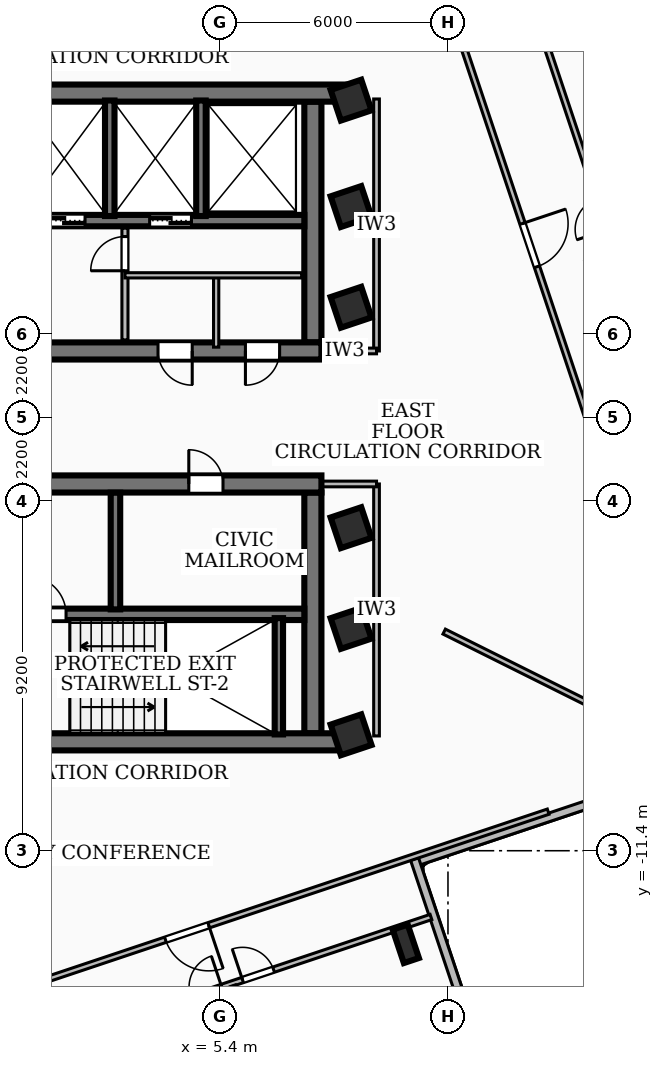
"""IFC4 building model, lengths in metres.
Left out: names, types, materials, properties, quantities, classifications, styles, units other than length and angle.
Written with IfcOpenShell. Run it as: python <this file> out.ifc"""

import sys

from ifc_helpers import new_model, si_unit, direction, frame, frame_2d, origin, origin_2d, place, context, subcontext, project, spatial, rectangle, i_section, extrude, element, fill, save


model = new_model("IFC4")
c1 = context("Model", 3, precision=1e-05, world=origin(), true_north=direction((0.0, 1.0)))
c2 = subcontext(c1, "Body", "Model", "MODEL_VIEW")
j1 = project(units=[si_unit("LENGTHUNIT", "METRE"), si_unit("PLANEANGLEUNIT", "RADIAN")], contexts=[c1])
p1 = place(None, origin())
s1 = spatial("IfcSite", under=j1, at=p1, CompositionType="ELEMENT")
p2 = place(p1, origin())
s2 = spatial("IfcBuilding", under=s1, at=p2, CompositionType="ELEMENT")
p3 = place(p2, frame((0.0, 0.0, 163.08)))
s3 = spatial("IfcBuildingStorey", under=s2, at=p3, CompositionType="ELEMENT", Elevation=163.08)
p4 = place(p3, frame((-8.78, 8.535, 0.0), z_axis=(0.0, 0.0, 1.0), x_axis=(1.0, 0.0, 0.0)))
e1 = element("IfcWall", 1, at=p4, inside=s3, PredefinedType="SHEAR", context=c2, shape_type="SweptSolid", body=[
    extrude(rectangle(XDim=17.56, YDim=0.45, at=frame_2d((8.78, 0.0))), origin(), (0.0, 0.0, 1.0), 3.34),
])
p5 = place(p3, frame((8.07, 1.75, 0.0), z_axis=(0.0, 0.0, 1.0), x_axis=(-1.0, 0.0, 0.0)))
e2 = element("IfcWall", 2, at=p5, inside=s3, PredefinedType="SHEAR", context=c2, shape_type="SweptSolid", body=[
    extrude(rectangle(XDim=16.14, YDim=0.45, at=frame_2d((8.07, 0.0))), origin(), (0.0, 0.0, 1.0), 3.34),
])
p6 = place(p5, frame((7.45, 0.0, 0.0)))
e3 = element("IfcOpeningElement", 3, at=p6, cuts=e2, PredefinedType="OPENING", context=c2, shape_type="SweptSolid", body=[
    extrude(rectangle(XDim=1.0, YDim=2.1, at=frame_2d((0.5, 1.05))), frame((0.0, 0.235, 0.0), z_axis=(0.0, -1.0, 0.0), x_axis=(1.0, 0.0, 0.0)), (0.0, 0.0, 1.0), 0.47),
])
p7 = place(p5, frame((3.4, 0.0, 0.0)))
e4 = element("IfcOpeningElement", 4, at=p7, cuts=e2, PredefinedType="OPENING", context=c2, shape_type="SweptSolid", body=[
    extrude(rectangle(XDim=0.9, YDim=2.06, at=frame_2d((0.45, 1.03))), frame((0.0, 0.235, 0.0), z_axis=(0.0, -1.0, 0.0), x_axis=(1.0, 0.0, 0.0)), (0.0, 0.0, 1.0), 0.47),
])
p8 = place(p5, frame((1.1, 0.0, 0.0)))
e5 = element("IfcOpeningElement", 5, at=p8, cuts=e2, PredefinedType="OPENING", context=c2, shape_type="SweptSolid", body=[
    extrude(rectangle(XDim=0.9, YDim=2.06, at=frame_2d((0.45, 1.03))), frame((0.0, 0.235, 0.0), z_axis=(0.0, -1.0, 0.0), x_axis=(1.0, 0.0, 0.0)), (0.0, 0.0, 1.0), 0.47),
])
p9 = place(p3, frame((7.845, 8.31, 0.0), z_axis=(0.0, 0.0, 1.0), x_axis=(0.0, -1.0, 0.0)))
e6 = element("IfcWall", 6, at=p9, inside=s3, PredefinedType="SHEAR", context=c2, shape_type="SweptSolid", body=[
    extrude(rectangle(XDim=6.335, YDim=0.45, at=frame_2d((3.167, 0.0))), origin(), (0.0, 0.0, 1.0), 3.34),
])
p10 = place(p3, frame((7.62, 5.18, 0.0), z_axis=(0.0, 0.0, 1.0), x_axis=(-1.0, 0.0, 0.0)))
e7 = element("IfcWall", 7, at=p10, inside=s3, PredefinedType="SOLIDWALL", context=c2, shape_type="SweptSolid", body=[
    extrude(rectangle(XDim=15.24, YDim=0.3, at=frame_2d((7.62, 0.0))), origin(), (0.0, 0.0, 1.0), 3.34),
])
p11 = place(p10, frame((5.77, 0.0, 0.0)))
e8 = element("IfcOpeningElement", 8, at=p11, cuts=e7, PredefinedType="OPENING", context=c2, shape_type="SweptSolid", body=[
    extrude(rectangle(XDim=1.1, YDim=2.15, at=frame_2d((0.55, 1.075))), frame((0.0, 0.16, 0.0), z_axis=(0.0, -1.0, 0.0), x_axis=(1.0, 0.0, 0.0)), (0.0, 0.0, 1.0), 0.32),
])
p12 = place(p10, frame((2.97, 0.0, 0.0)))
e9 = element("IfcOpeningElement", 9, at=p12, cuts=e7, PredefinedType="OPENING", context=c2, shape_type="SweptSolid", body=[
    extrude(rectangle(XDim=1.1, YDim=2.15, at=frame_2d((0.55, 1.075))), frame((0.0, 0.16, 0.0), z_axis=(0.0, -1.0, 0.0), x_axis=(1.0, 0.0, 0.0)), (0.0, 0.0, 1.0), 0.32),
])
p13 = place(p10, frame((7.97, 0.0, 0.0)))
e10 = element("IfcOpeningElement", 10, at=p13, cuts=e7, PredefinedType="OPENING", context=c2, shape_type="SweptSolid", body=[
    extrude(rectangle(XDim=1.0, YDim=2.1, at=frame_2d((0.5, 1.05))), frame((0.0, 0.16, 0.0), z_axis=(0.0, -1.0, 0.0), x_axis=(1.0, 0.0, 0.0)), (0.0, 0.0, 1.0), 0.32),
])
p14 = place(p3, frame((8.78, -8.535, 0.0), z_axis=(0.0, 0.0, 1.0), x_axis=(-1.0, 0.0, 0.0)))
e11 = element("IfcWall", 11, at=p14, inside=s3, PredefinedType="SHEAR", context=c2, shape_type="SweptSolid", body=[
    extrude(rectangle(XDim=17.56, YDim=0.45, at=frame_2d((8.78, 0.0))), origin(), (0.0, 0.0, 1.0), 3.34),
])
p15 = place(p3, frame((-8.07, -1.75, 0.0), z_axis=(0.0, 0.0, 1.0), x_axis=(1.0, 0.0, 0.0)))
e12 = element("IfcWall", 12, at=p15, inside=s3, PredefinedType="SHEAR", context=c2, shape_type="SweptSolid", body=[
    extrude(rectangle(XDim=16.14, YDim=0.45, at=frame_2d((8.07, 0.0))), origin(), (0.0, 0.0, 1.0), 3.34),
])
p16 = place(p15, frame((7.45, 0.0, 0.0)))
e13 = element("IfcOpeningElement", 13, at=p16, cuts=e12, PredefinedType="OPENING", context=c2, shape_type="SweptSolid", body=[
    extrude(rectangle(XDim=1.0, YDim=2.1, at=frame_2d((0.5, 1.05))), frame((0.0, 0.235, 0.0), z_axis=(0.0, -1.0, 0.0), x_axis=(1.0, 0.0, 0.0)), (0.0, 0.0, 1.0), 0.47),
])
p17 = place(p15, frame((12.65, 0.0, 0.0)))
e14 = element("IfcOpeningElement", 14, at=p17, cuts=e12, PredefinedType="OPENING", context=c2, shape_type="SweptSolid", body=[
    extrude(rectangle(XDim=0.9, YDim=2.06, at=frame_2d((0.45, 1.03))), frame((0.0, 0.235, 0.0), z_axis=(0.0, -1.0, 0.0), x_axis=(1.0, 0.0, 0.0)), (0.0, 0.0, 1.0), 0.47),
])
p18 = place(p15, frame((0.565, 0.0, 0.0)))
e15 = element("IfcOpeningElement", 15, at=p18, cuts=e12, PredefinedType="OPENING", context=c2, shape_type="SweptSolid", body=[
    extrude(rectangle(XDim=1.05, YDim=2.15, at=frame_2d((0.525, 1.075))), frame((0.0, 0.235, 0.0), z_axis=(0.0, -1.0, 0.0), x_axis=(1.0, 0.0, 0.0)), (0.0, 0.0, 1.0), 0.47),
])
p19 = place(p15, frame((2.125, 0.0, 0.0)))
e16 = element("IfcOpeningElement", 16, at=p19, cuts=e12, PredefinedType="OPENING", context=c2, shape_type="SweptSolid", body=[
    extrude(rectangle(XDim=1.05, YDim=2.15, at=frame_2d((0.525, 1.075))), frame((0.0, 0.235, 0.0), z_axis=(0.0, -1.0, 0.0), x_axis=(1.0, 0.0, 0.0)), (0.0, 0.0, 1.0), 0.47),
])
p20 = place(p15, frame((3.685, 0.0, 0.0)))
e17 = element("IfcOpeningElement", 17, at=p20, cuts=e12, PredefinedType="OPENING", context=c2, shape_type="SweptSolid", body=[
    extrude(rectangle(XDim=1.05, YDim=2.15, at=frame_2d((0.525, 1.075))), frame((0.0, 0.235, 0.0), z_axis=(0.0, -1.0, 0.0), x_axis=(1.0, 0.0, 0.0)), (0.0, 0.0, 1.0), 0.47),
])
p21 = place(p3, frame((7.845, -1.975, 0.0), z_axis=(0.0, 0.0, 1.0), x_axis=(0.0, -1.0, 0.0)))
e18 = element("IfcWall", 18, at=p21, inside=s3, PredefinedType="SHEAR", context=c2, shape_type="SweptSolid", body=[
    extrude(rectangle(XDim=6.335, YDim=0.45, at=frame_2d((3.167, 0.0))), origin(), (0.0, 0.0, 1.0), 3.34),
])
p22 = place(p3, frame((-7.62, -5.18, 0.0), z_axis=(0.0, 0.0, 1.0), x_axis=(1.0, 0.0, 0.0)))
e19 = element("IfcWall", 19, at=p22, inside=s3, PredefinedType="SOLIDWALL", context=c2, shape_type="SweptSolid", body=[
    extrude(rectangle(XDim=15.24, YDim=0.3, at=frame_2d((7.62, 0.0))), origin(), (0.0, 0.0, 1.0), 3.34),
])
p23 = place(p22, frame((5.77, 0.0, 0.0)))
e20 = element("IfcOpeningElement", 20, at=p23, cuts=e19, PredefinedType="OPENING", context=c2, shape_type="SweptSolid", body=[
    extrude(rectangle(XDim=1.1, YDim=2.15, at=frame_2d((0.55, 1.075))), frame((0.0, 0.16, 0.0), z_axis=(0.0, -1.0, 0.0), x_axis=(1.0, 0.0, 0.0)), (0.0, 0.0, 1.0), 0.32),
])
p24 = place(p22, frame((7.97, 0.0, 0.0)))
e21 = element("IfcOpeningElement", 21, at=p24, cuts=e19, PredefinedType="OPENING", context=c2, shape_type="SweptSolid", body=[
    extrude(rectangle(XDim=1.0, YDim=2.1, at=frame_2d((0.5, 1.05))), frame((0.0, 0.16, 0.0), z_axis=(0.0, -1.0, 0.0), x_axis=(1.0, 0.0, 0.0)), (0.0, 0.0, 1.0), 0.32),
])
p25 = place(p3, frame((6.95, -8.34, 0.0), z_axis=(0.0, 0.0, 1.0), x_axis=(0.0, 1.0, 0.0)))
e22 = element("IfcWall", 22, at=p25, inside=s3, PredefinedType="SOLIDWALL", context=c2, shape_type="SweptSolid", body=[
    extrude(rectangle(XDim=3.06, YDim=0.22, at=frame_2d((1.53, 0.0))), origin(), (0.0, 0.0, 1.0), 3.34),
])
for number, where, z_axis, x_axis in (
    (23, (2.5, 5.3, 0.0), (0.0, 0.0, 1.0), (0.0, 1.0, 0.0)),
    (24, (4.9, 5.3, 0.0), (0.0, 0.0, 1.0), (0.0, 1.0, 0.0)),
):
    element("IfcWall", number, at=place(p3, frame(where, z_axis=z_axis, x_axis=x_axis)), inside=s3, PredefinedType="SOLIDWALL", context=c2, shape_type="SweptSolid", body=[
        extrude(rectangle(XDim=3.04, YDim=0.25, at=frame_2d((1.52, 0.0))), origin(), (0.0, 0.0, 1.0), 3.34),
    ])
p26 = place(p3, frame((2.65, -5.05, 0.0), z_axis=(0.0, 0.0, 1.0), x_axis=(0.0, 1.0, 0.0)))
e25 = element("IfcWall", 25, at=p26, inside=s3, PredefinedType="SOLIDWALL", context=c2, shape_type="SweptSolid", body=[
    extrude(rectangle(XDim=3.07, YDim=0.25, at=frame_2d((1.535, 0.0))), origin(), (0.0, 0.0, 1.0), 3.34),
])
for number, where, z_axis, x_axis in (
    (26, (8.85, -5.55, 0.0), (0.0, 0.0, 1.0), (0.948, 0.317, 0.0)),
    (27, (8.85, -2.9, 0.0), (0.0, 0.0, 1.0), (0.948, 0.317, 0.0)),
    (28, (8.85, 2.9, 0.0), (0.0, 0.0, 1.0), (0.948, 0.317, 0.0)),
    (29, (8.85, 5.55, 0.0), (0.0, 0.0, 1.0), (0.948, 0.317, 0.0)),
    (30, (8.85, -8.35, 0.0), (0.0, 0.0, 1.0), (0.948, 0.317, 0.0)),
    (31, (8.85, 8.35, 0.0), (0.0, 0.0, 1.0), (0.948, 0.317, 0.0)),
):
    element("IfcColumn", number, at=place(p3, frame(where, z_axis=z_axis, x_axis=x_axis)), inside=s3, PredefinedType="COLUMN", context=c2, shape_type="SweptSolid", body=[
        extrude(rectangle(XDim=0.85, YDim=0.85, at=origin_2d()), origin(), (0.0, 0.0, 1.0), 3.6),
    ])
p27 = place(p3, frame((10.29, -13.85, 0.0), z_axis=(0.0, 0.0, 1.0), x_axis=(0.948323655206, 0.317304656405, 0.0)))
e32 = element("IfcColumn", 32, at=p27, inside=s3, PredefinedType="COLUMN", context=c2, shape_type="SweptSolid", body=[
    extrude(i_section(OverallWidth=0.418, OverallDepth=0.927, WebThickness=0.019, FlangeThickness=0.032, at=origin_2d()), origin(), (0.0, 0.0, 1.0), 3.6),
])
p28 = place(p3, frame((16.873, -9.581, 0.0), z_axis=(0.0, 0.0, 1.0), x_axis=(-0.94829606055, -0.317387116224, 0.0)))
e33 = element("IfcWall", 33, at=p28, inside=s3, PredefinedType="SOLIDWALL", context=c2, shape_type="SweptSolid", body=[
    extrude(rectangle(XDim=6.758, YDim=0.22, at=frame_2d((3.379, 0.0))), origin(), (0.0, 0.0, 1.0), 3.34),
])
p29 = place(p3, frame((10.519, -11.615, 0.0), z_axis=(0.0, 0.0, 1.0), x_axis=(0.317347016501, -0.948309480664, 0.0)))
e34 = element("IfcWall", 34, at=p29, inside=s3, PredefinedType="SOLIDWALL", context=c2, shape_type="SweptSolid", body=[
    extrude(rectangle(XDim=7.458, YDim=0.22, at=frame_2d((3.729, 0.0))), origin(), (0.0, 0.0, 1.0), 3.34),
])
p30 = place(p3, frame((2.9, 2.04, 0.0), z_axis=(0.0, 0.0, 1.0), x_axis=(0.0, 1.0, 0.0)))
e35 = element("IfcWall", 35, at=p30, inside=s3, PredefinedType="PARTITIONING", context=c2, shape_type="SweptSolid", body=[
    extrude(rectangle(XDim=2.94, YDim=0.16, at=frame_2d((1.47, 0.0))), origin(), (0.0, 0.0, 1.0), 2.57),
])
p31 = place(p30, frame((1.82, 0.0, 0.0)))
e36 = element("IfcOpeningElement", 36, at=p31, cuts=e35, PredefinedType="OPENING", context=c2, shape_type="SweptSolid", body=[
    extrude(rectangle(XDim=0.9, YDim=2.06, at=frame_2d((0.45, 1.03))), frame((0.0, 0.09, 0.0), z_axis=(0.0, -1.0, 0.0), x_axis=(1.0, 0.0, 0.0)), (0.0, 0.0, 1.0), 0.18),
])
p32 = place(p3, frame((2.9, 3.74, 0.0), z_axis=(0.0, 0.0, 1.0), x_axis=(1.0, 0.0, 0.0)))
e37 = element("IfcWall", 37, at=p32, inside=s3, PredefinedType="PARTITIONING", context=c2, shape_type="SweptSolid", body=[
    extrude(rectangle(XDim=4.65, YDim=0.138, at=frame_2d((2.325, 0.0))), origin(), (0.0, 0.0, 1.0), 3.34),
])
p33 = place(p3, frame((5.3, 1.85, 0.0), z_axis=(0.0, 0.0, 1.0), x_axis=(0.0, 1.0, 0.0)))
e38 = element("IfcWall", 38, at=p33, inside=s3, PredefinedType="PARTITIONING", context=c2, shape_type="SweptSolid", body=[
    extrude(rectangle(XDim=1.89, YDim=0.138, at=frame_2d((0.945, 0.0))), origin(), (0.0, 0.0, 1.0), 2.57),
])
p34 = place(p3, frame((9.52, 1.75, 0.0), z_axis=(0.0, 0.0, 1.0), x_axis=(0.0, 1.0, 0.0)))
e39 = element("IfcWall", 39, at=p34, inside=s3, PredefinedType="PARTITIONING", context=c2, shape_type="SweptSolid", body=[
    extrude(rectangle(XDim=6.63, YDim=0.15, at=frame_2d((3.315, 0.0))), origin(), (0.0, 0.0, 1.0), 2.644),
])
p35 = place(p3, frame((7.85, 1.75, 0.0), z_axis=(0.0, 0.0, 1.0), x_axis=(1.0, 0.0, 0.0)))
e40 = element("IfcWall", 40, at=p35, inside=s3, PredefinedType="PARTITIONING", context=c2, shape_type="SweptSolid", body=[
    extrude(rectangle(XDim=1.67, YDim=0.15, at=frame_2d((0.835, 0.0))), origin(), (0.0, 0.0, 1.0), 2.57),
])
p36 = place(p3, frame((9.52, -8.38, 0.0), z_axis=(0.0, 0.0, 1.0), x_axis=(0.0, 1.0, 0.0)))
e41 = element("IfcWall", 41, at=p36, inside=s3, PredefinedType="PARTITIONING", context=c2, shape_type="SweptSolid", body=[
    extrude(rectangle(XDim=6.63, YDim=0.15, at=frame_2d((3.315, 0.0))), origin(), (0.0, 0.0, 1.0), 3.34),
])
p37 = place(p3, frame((7.85, -1.75, 0.0), z_axis=(0.0, 0.0, 1.0), x_axis=(1.0, 0.0, 0.0)))
e42 = element("IfcWall", 42, at=p37, inside=s3, PredefinedType="PARTITIONING", context=c2, shape_type="SweptSolid", body=[
    extrude(rectangle(XDim=1.67, YDim=0.15, at=frame_2d((0.835, 0.0))), origin(), (0.0, 0.0, 1.0), 2.57),
])
p38 = place(p3, frame((11.3, -5.634, 0.0), z_axis=(0.0, 0.0, 1.0), x_axis=(0.894904738475, -0.446257222972, 0.0)))
e43 = element("IfcWall", 43, at=p38, inside=s3, PredefinedType="PARTITIONING", context=c2, shape_type="SweptSolid", body=[
    extrude(rectangle(XDim=7.048, YDim=0.145, at=frame_2d((3.524, 0.0))), origin(), (0.0, 0.0, 1.0), 3.34),
])
p39 = place(p3, frame((10.372, 14.037, 0.0), z_axis=(0.0, 0.0, 1.0), x_axis=(0.317298382655, -0.94832575435, 0.0)))
e44 = element("IfcWall", 44, at=p39, inside=s3, PredefinedType="PARTITIONING", context=c2, shape_type="SweptSolid", body=[
    extrude(rectangle(XDim=20.041, YDim=0.145, at=frame_2d((10.021, 0.0))), origin(), (0.0, 0.0, 1.0), 2.644),
])
p40 = place(p39, frame((9.42, 0.0, 0.0)))
e45 = element("IfcOpeningElement", 45, at=p40, cuts=e44, PredefinedType="OPENING", context=c2, shape_type="SweptSolid", body=[
    extrude(rectangle(XDim=1.2, YDim=2.1, at=frame_2d((0.6, 1.05))), frame((0.0, 0.083, 0.0), z_axis=(0.0, -1.0, 0.0), x_axis=(1.0, 0.0, 0.0)), (0.0, 0.0, 1.0), 0.165),
])
p41 = place(p3, frame((17.496, -0.7, 0.0), z_axis=(0.0, 0.0, 1.0), x_axis=(-0.317299961245, 0.948325226172, 0.0)))
e46 = element("IfcWall", 46, at=p41, inside=s3, PredefinedType="PARTITIONING", context=c2, shape_type="SweptSolid", body=[
    extrude(rectangle(XDim=12.43, YDim=0.145, at=frame_2d((6.215, 0.0))), origin(), (0.0, 0.0, 1.0), 2.644),
])
p42 = place(p41, frame((4.515, 0.0, 0.0)))
e47 = element("IfcOpeningElement", 47, at=p42, cuts=e46, PredefinedType="OPENING", context=c2, shape_type="SweptSolid", body=[
    extrude(rectangle(XDim=0.86, YDim=2.04, at=frame_2d((0.43, 1.02))), frame((0.0, 0.083, 0.0), z_axis=(0.0, -1.0, 0.0), x_axis=(1.0, 0.0, 0.0)), (0.0, 0.0, 1.0), 0.165),
])
p43 = place(p41, frame((5.955, 0.0, 0.0)))
e48 = element("IfcOpeningElement", 48, at=p43, cuts=e46, PredefinedType="OPENING", context=c2, shape_type="SweptSolid", body=[
    extrude(rectangle(XDim=0.86, YDim=2.04, at=frame_2d((0.43, 1.02))), frame((0.0, 0.083, 0.0), z_axis=(0.0, -1.0, 0.0), x_axis=(1.0, 0.0, 0.0)), (0.0, 0.0, 1.0), 0.165),
])
p44 = place(p3, frame((14.037, -10.372, 0.0), z_axis=(0.0, 0.0, 1.0), x_axis=(-0.94832575435, -0.317298382655, 0.0)))
e49 = element("IfcWall", 49, at=p44, inside=s3, PredefinedType="PARTITIONING", context=c2, shape_type="SweptSolid", body=[
    extrude(rectangle(XDim=20.041, YDim=0.145, at=frame_2d((10.021, 0.0))), origin(), (0.0, 0.0, 1.0), 2.644),
])
p45 = place(p44, frame((9.42, 0.0, 0.0)))
e50 = element("IfcOpeningElement", 50, at=p45, cuts=e49, PredefinedType="OPENING", context=c2, shape_type="SweptSolid", body=[
    extrude(rectangle(XDim=1.2, YDim=2.1, at=frame_2d((0.6, 1.05))), frame((0.0, 0.083, 0.0), z_axis=(0.0, -1.0, 0.0), x_axis=(1.0, 0.0, 0.0)), (0.0, 0.0, 1.0), 0.165),
])
p46 = place(p3, frame((5.741, -14.951, 0.0), z_axis=(0.0, 0.0, 1.0), x_axis=(0.317273194857, -0.948334181513, 0.0)))
e51 = element("IfcWall", 51, at=p46, inside=s3, PredefinedType="PARTITIONING", context=c2, shape_type="SweptSolid", body=[
    extrude(rectangle(XDim=7.215, YDim=0.145, at=frame_2d((3.607, 0.0))), origin(), (0.0, 0.0, 1.0), 3.34),
])
p47 = place(p3, frame((-0.836, -17.088, 0.0), z_axis=(0.0, 0.0, 1.0), x_axis=(0.948331136084, 0.317282297544, 0.0)))
e52 = element("IfcWall", 52, at=p47, inside=s3, PredefinedType="PARTITIONING", context=c2, shape_type="SweptSolid", body=[
    extrude(rectangle(XDim=12.43, YDim=0.145, at=frame_2d((6.215, 0.0))), origin(), (0.0, 0.0, 1.0), 2.644),
])
p48 = place(p47, frame((5.765, 0.0, 0.0)))
e53 = element("IfcOpeningElement", 53, at=p48, cuts=e52, PredefinedType="OPENING", context=c2, shape_type="SweptSolid", body=[
    extrude(rectangle(XDim=0.86, YDim=2.04, at=frame_2d((0.43, 1.02))), frame((0.0, 0.083, 0.0), z_axis=(0.0, -1.0, 0.0), x_axis=(1.0, 0.0, 0.0)), (0.0, 0.0, 1.0), 0.165),
])
p49 = place(p47, frame((7.204, 0.0, 0.0)))
e54 = element("IfcOpeningElement", 54, at=p49, cuts=e52, PredefinedType="OPENING", context=c2, shape_type="SweptSolid", body=[
    extrude(rectangle(XDim=0.86, YDim=2.04, at=frame_2d((0.43, 1.02))), frame((0.0, 0.083, 0.0), z_axis=(0.0, -1.0, 0.0), x_axis=(1.0, 0.0, 0.0)), (0.0, 0.0, 1.0), 0.165),
])
p50 = place(p11, origin())
e55 = element("IfcDoor", 55, at=p50, inside=s3, OperationType="DOUBLE_DOOR_SLIDING", PredefinedType="DOOR", context=c2, shape_type="SweptSolid", body=[
    extrude(rectangle(XDim=1.1, YDim=2.15, at=frame_2d((0.55, 1.075))), frame((0.0, 0.025, 0.0), z_axis=(0.0, -1.0, 0.0), x_axis=(1.0, 0.0, 0.0)), (0.0, 0.0, 1.0), 0.05),
])
fill(e8, e55)
p51 = place(p12, origin())
e56 = element("IfcDoor", 56, at=p51, inside=s3, OperationType="DOUBLE_DOOR_SLIDING", PredefinedType="DOOR", context=c2, shape_type="SweptSolid", body=[
    extrude(rectangle(XDim=1.1, YDim=2.15, at=frame_2d((0.55, 1.075))), frame((0.0, 0.025, 0.0), z_axis=(0.0, -1.0, 0.0), x_axis=(1.0, 0.0, 0.0)), (0.0, 0.0, 1.0), 0.05),
])
fill(e9, e56)
p52 = place(p24, origin())
e57 = element("IfcDoor", 57, at=p52, inside=s3, OperationType="SINGLE_SWING_LEFT", PredefinedType="DOOR", context=c2, shape_type="SweptSolid", body=[
    extrude(rectangle(XDim=1.0, YDim=2.1, at=frame_2d((0.5, 1.05))), frame((0.0, 0.025, 0.0), z_axis=(0.0, -1.0, 0.0), x_axis=(1.0, 0.0, 0.0)), (0.0, 0.0, 1.0), 0.05),
])
fill(e21, e57)
p53 = place(p17, origin())
e58 = element("IfcDoor", 58, at=p53, inside=s3, OperationType="SINGLE_SWING_LEFT", PredefinedType="DOOR", context=c2, shape_type="SweptSolid", body=[
    extrude(rectangle(XDim=0.9, YDim=2.06, at=frame_2d((0.45, 1.03))), frame((0.0, 0.025, 0.0), z_axis=(0.0, -1.0, 0.0), x_axis=(1.0, 0.0, 0.0)), (0.0, 0.0, 1.0), 0.05),
])
fill(e14, e58)
p54 = place(p7, origin())
e59 = element("IfcDoor", 59, at=p54, inside=s3, OperationType="SINGLE_SWING_LEFT", PredefinedType="DOOR", context=c2, shape_type="SweptSolid", body=[
    extrude(rectangle(XDim=0.9, YDim=2.06, at=frame_2d((0.45, 1.03))), frame((0.0, 0.025, 0.0), z_axis=(0.0, -1.0, 0.0), x_axis=(1.0, 0.0, 0.0)), (0.0, 0.0, 1.0), 0.05),
])
fill(e4, e59)
p55 = place(p8, origin())
e60 = element("IfcDoor", 60, at=p55, inside=s3, OperationType="SINGLE_SWING_RIGHT", PredefinedType="DOOR", context=c2, shape_type="SweptSolid", body=[
    extrude(rectangle(XDim=0.9, YDim=2.06, at=frame_2d((0.45, 1.03))), frame((0.0, 0.025, 0.0), z_axis=(0.0, -1.0, 0.0), x_axis=(1.0, 0.0, 0.0)), (0.0, 0.0, 1.0), 0.05),
])
fill(e5, e60)
p56 = place(p31, origin())
e61 = element("IfcDoor", 61, at=p56, inside=s3, OperationType="SINGLE_SWING_LEFT", PredefinedType="DOOR", context=c2, shape_type="SweptSolid", body=[
    extrude(rectangle(XDim=0.9, YDim=2.06, at=frame_2d((0.45, 1.03))), frame((0.0, 0.025, 0.0), z_axis=(0.0, -1.0, 0.0), x_axis=(1.0, 0.0, 0.0)), (0.0, 0.0, 1.0), 0.05),
])
fill(e36, e61)
p57 = place(p40, origin())
e62 = element("IfcDoor", 62, at=p57, inside=s3, OperationType="SINGLE_SWING_LEFT", PredefinedType="DOOR", context=c2, shape_type="SweptSolid", body=[
    extrude(rectangle(XDim=1.2, YDim=2.1, at=frame_2d((0.6, 1.05))), frame((0.0, 0.025, 0.0), z_axis=(0.0, -1.0, 0.0), x_axis=(1.0, 0.0, 0.0)), (0.0, 0.0, 1.0), 0.05),
])
fill(e45, e62)
p58 = place(p45, origin())
e63 = element("IfcDoor", 63, at=p58, inside=s3, OperationType="SINGLE_SWING_LEFT", PredefinedType="DOOR", context=c2, shape_type="SweptSolid", body=[
    extrude(rectangle(XDim=1.2, YDim=2.1, at=frame_2d((0.6, 1.05))), frame((0.0, 0.025, 0.0), z_axis=(0.0, -1.0, 0.0), x_axis=(1.0, 0.0, 0.0)), (0.0, 0.0, 1.0), 0.05),
])
fill(e50, e63)
p59 = place(p49, origin())
e64 = element("IfcDoor", 64, at=p59, inside=s3, OperationType="SINGLE_SWING_LEFT", PredefinedType="DOOR", context=c2, shape_type="SweptSolid", body=[
    extrude(rectangle(XDim=0.86, YDim=2.04, at=frame_2d((0.43, 1.02))), frame((0.0, 0.025, 0.0), z_axis=(0.0, -1.0, 0.0), x_axis=(1.0, 0.0, 0.0)), (0.0, 0.0, 1.0), 0.05),
])
fill(e54, e64)
save(model, sys.argv[1])
